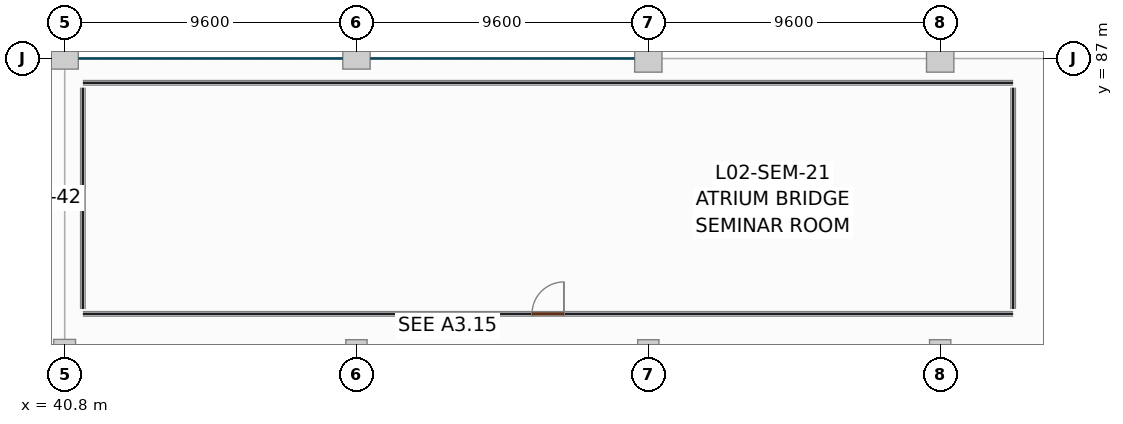
"""IFC4 building model, lengths in metres.
Left out: names, types, materials, properties, quantities, classifications, styles, units other than length and angle.
Written with IfcOpenShell. Run it as: python <this file> out.ifc"""

import sys

from ifc_helpers import new_model, si_unit, direction, frame, frame_2d, origin, origin_2d, place, context, subcontext, project, spatial, rectangle, extrude, element, fill, save


model = new_model("IFC4")
c1 = context("Model", 3, precision=1e-05, world=origin(), true_north=direction((0.0, 1.0)))
c2 = subcontext(c1, "Body", "Model", "MODEL_VIEW")
j1 = project(units=[si_unit("LENGTHUNIT", "METRE"), si_unit("PLANEANGLEUNIT", "RADIAN")], contexts=[c1])
p1 = place(None, origin())
s1 = spatial("IfcSite", under=j1, at=p1, CompositionType="ELEMENT")
p2 = place(p1, origin())
s2 = spatial("IfcBuilding", under=s1, at=p2, CompositionType="ELEMENT")
p3 = place(p2, frame((0.0, 0.0, 9.9)))
s3 = spatial("IfcBuildingStorey", under=s2, at=p3, CompositionType="ELEMENT", Elevation=9.9)
p4 = place(p3, frame((40.8, 77.4, 0.0), z_axis=(0.0, 0.0, 1.0), x_axis=(1.0, 0.0, 0.0)))
e1 = element("IfcColumn", 1, at=p4, inside=s3, PredefinedType="COLUMN", context=c2, shape_type="SweptSolid", body=[
    extrude(rectangle(XDim=0.72, YDim=0.72, at=origin_2d()), origin(), (0.0, 0.0, 1.0), 3.9),
])
p5 = place(p3, frame((40.8, 87.0, 0.0), z_axis=(0.0, 0.0, 1.0), x_axis=(1.0, 0.0, 0.0)))
e2 = element("IfcColumn", 2, at=p5, inside=s3, PredefinedType="COLUMN", context=c2, shape_type="SweptSolid", body=[
    extrude(rectangle(XDim=0.9, YDim=0.7, at=origin_2d()), origin(), (0.0, 0.0, 1.0), 3.9),
])
p6 = place(p3, frame((50.4, 77.4, 0.0), z_axis=(0.0, 0.0, 1.0), x_axis=(1.0, 0.0, 0.0)))
e3 = element("IfcColumn", 3, at=p6, inside=s3, PredefinedType="COLUMN", context=c2, shape_type="SweptSolid", body=[
    extrude(rectangle(XDim=0.7, YDim=0.7, at=origin_2d()), origin(), (0.0, 0.0, 1.0), 3.9),
])
p7 = place(p3, frame((50.4, 87.0, 0.0), z_axis=(0.0, 0.0, 1.0), x_axis=(1.0, 0.0, 0.0)))
e4 = element("IfcColumn", 4, at=p7, inside=s3, PredefinedType="COLUMN", context=c2, shape_type="SweptSolid", body=[
    extrude(rectangle(XDim=0.9, YDim=0.7, at=origin_2d()), origin(), (0.0, 0.0, 1.0), 3.9),
])
p8 = place(p3, frame((60.0, 77.4, 0.0), z_axis=(0.0, 0.0, 1.0), x_axis=(1.0, 0.0, 0.0)))
e5 = element("IfcColumn", 5, at=p8, inside=s3, PredefinedType="COLUMN", context=c2, shape_type="SweptSolid", body=[
    extrude(rectangle(XDim=0.7, YDim=0.7, at=origin_2d()), origin(), (0.0, 0.0, 1.0), 3.9),
])
p9 = place(p3, frame((60.0, 87.0, 0.0), z_axis=(0.0, 0.0, 1.0), x_axis=(1.0, 0.0, 0.0)))
e6 = element("IfcColumn", 6, at=p9, inside=s3, PredefinedType="COLUMN", context=c2, shape_type="SweptSolid", body=[
    extrude(rectangle(XDim=0.9, YDim=0.9, at=origin_2d()), origin(), (0.0, 0.0, 1.0), 3.9),
])
p10 = place(p3, frame((69.6, 77.4, 0.0), z_axis=(0.0, 0.0, 1.0), x_axis=(1.0, 0.0, 0.0)))
e7 = element("IfcColumn", 7, at=p10, inside=s3, PredefinedType="COLUMN", context=c2, shape_type="SweptSolid", body=[
    extrude(rectangle(XDim=0.7, YDim=0.7, at=origin_2d()), origin(), (0.0, 0.0, 1.0), 3.9),
])
p11 = place(p3, frame((69.6, 87.0, 0.0), z_axis=(0.0, 0.0, 1.0), x_axis=(1.0, 0.0, 0.0)))
e8 = element("IfcColumn", 8, at=p11, inside=s3, PredefinedType="COLUMN", context=c2, shape_type="SweptSolid", body=[
    extrude(rectangle(XDim=0.9, YDim=0.9, at=origin_2d()), origin(), (0.0, 0.0, 1.0), 3.9),
])
p12 = place(p3, frame((41.4, 78.6, 0.0), z_axis=(0.0, 0.0, 1.0), x_axis=(1.0, 0.0, 0.0)))
e9 = element("IfcWall", 9, at=p12, inside=s3, PredefinedType="PARTITIONING", context=c2, shape_type="SweptSolid", body=[
    extrude(rectangle(XDim=30.6, YDim=0.15, at=frame_2d((15.3, 0.0))), origin(), (0.0, 0.0, 1.0), 2.92),
])
p13 = place(p12, frame((14.775, 0.0, 0.0)))
e10 = element("IfcOpeningElement", 10, at=p13, cuts=e9, PredefinedType="OPENING", context=c2, shape_type="SweptSolid", body=[
    extrude(rectangle(XDim=1.05, YDim=2.2, at=frame_2d((0.525, 1.1))), frame((0.0, 0.085, 0.0), z_axis=(0.0, -1.0, 0.0), x_axis=(1.0, 0.0, 0.0)), (0.0, 0.0, 1.0), 0.17),
])
p14 = place(p3, frame((41.4, 86.2, 0.0), z_axis=(0.0, 0.0, 1.0), x_axis=(1.0, 0.0, 0.0)))
e11 = element("IfcWall", 11, at=p14, inside=s3, PredefinedType="PARTITIONING", context=c2, shape_type="SweptSolid", body=[
    extrude(rectangle(XDim=30.6, YDim=0.15, at=frame_2d((15.3, 0.0))), origin(), (0.0, 0.0, 1.0), 2.92),
])
for number, where, z_axis, x_axis in (
    (12, (41.4, 78.76, 0.0), (0.0, 0.0, 1.0), (0.0, 1.0, 0.0)),
    (13, (72.0, 78.76, 0.0), (0.0, 0.0, 1.0), (0.0, 1.0, 0.0)),
):
    element("IfcWall", number, at=place(p3, frame(where, z_axis=z_axis, x_axis=x_axis)), inside=s3, PredefinedType="PARTITIONING", context=c2, shape_type="SweptSolid", body=[
        extrude(rectangle(XDim=7.28, YDim=0.15, at=frame_2d((3.64, 0.0))), origin(), (0.0, 0.0, 1.0), 2.92),
    ])
p15 = place(p13, origin())
e14 = element("IfcDoor", 14, at=p15, inside=s3, OperationType="SINGLE_SWING_RIGHT", PredefinedType="DOOR", context=c2, shape_type="SweptSolid", body=[
    extrude(rectangle(XDim=1.05, YDim=2.2, at=frame_2d((0.525, 1.1))), frame((0.0, 0.025, 0.0), z_axis=(0.0, -1.0, 0.0), x_axis=(1.0, 0.0, 0.0)), (0.0, 0.0, 1.0), 0.05),
])
fill(e10, e14)
save(model, sys.argv[1])
